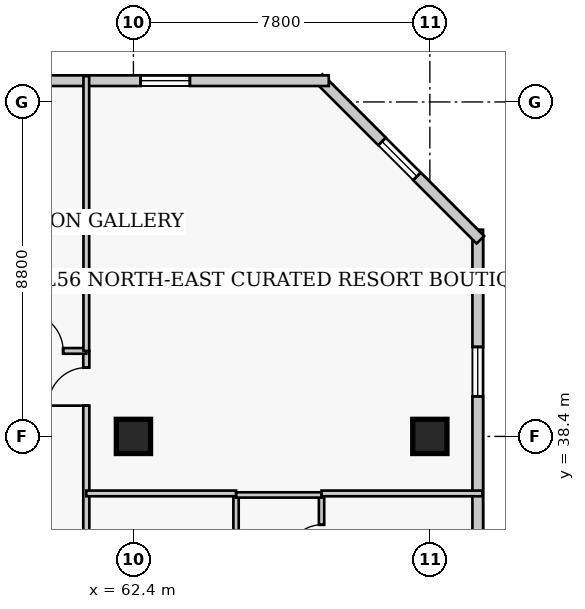
"""IFC4 building model, lengths in metres.
Left out: names, types, materials, properties, quantities, classifications, styles, units other than length and angle.
Written with IfcOpenShell. Run it as: python <this file> out.ifc"""

import sys

from ifc_helpers import new_model, si_unit, direction, frame, frame_2d, origin, origin_2d, place, context, subcontext, project, spatial, rectangle, extrude, element, fill, save


model = new_model("IFC4")
c1 = context("Model", 3, precision=1e-05, world=origin(), true_north=direction((0.0, 1.0)))
c2 = subcontext(c1, "Body", "Model", "MODEL_VIEW")
j1 = project(units=[si_unit("LENGTHUNIT", "METRE"), si_unit("PLANEANGLEUNIT", "RADIAN")], contexts=[c1])
p1 = place(None, origin())
s1 = spatial("IfcSite", under=j1, at=p1, CompositionType="ELEMENT")
p2 = place(p1, origin())
s2 = spatial("IfcBuilding", under=s1, at=p2, CompositionType="ELEMENT")
p3 = place(p2, frame((0.0, 0.0, 224.1)))
s3 = spatial("IfcBuildingStorey", under=s2, at=p3, CompositionType="ELEMENT", Elevation=224.1)
for number, where, z_axis, x_axis in (
    (1, (62.4, 38.4, 0.0), (0.0, 0.0, 1.0), (1.0, 0.0, 0.0)),
    (2, (70.2, 38.4, 0.0), (0.0, 0.0, 1.0), (1.0, 0.0, 0.0)),
):
    element("IfcColumn", number, at=place(p3, frame(where, z_axis=z_axis, x_axis=x_axis)), inside=s3, PredefinedType="COLUMN", context=c2, shape_type="SweptSolid", body=[
        extrude(rectangle(XDim=0.9, YDim=0.9, at=origin_2d()), origin(), (0.0, 0.0, 1.0), 3.9),
    ])
p4 = place(p3, frame((71.46, 13.96, 0.0), z_axis=(0.0, 0.0, 1.0), x_axis=(0.0, 1.0, 0.0)))
e3 = element("IfcWall", 3, at=p4, inside=s3, PredefinedType="SOLIDWALL", context=c2, shape_type="SweptSolid", body=[
    extrude(rectangle(XDim=29.88, YDim=0.28, at=frame_2d((14.94, 0.0))), origin(), (0.0, 0.0, 1.0), 3.65),
])
p5 = place(p4, frame((3.085, 0.0, 0.85)))
e4 = element("IfcOpeningElement", 4, at=p5, cuts=e3, PredefinedType="OPENING", context=c2, shape_type="SweptSolid", body=[
    extrude(rectangle(XDim=1.3, YDim=1.7, at=frame_2d((0.65, 0.85))), frame((0.0, 0.15, 0.0), z_axis=(0.0, -1.0, 0.0), x_axis=(1.0, 0.0, 0.0)), (0.0, 0.0, 1.0), 0.3),
])
p6 = place(p4, frame((10.555, 0.0, 0.85)))
e5 = element("IfcOpeningElement", 5, at=p6, cuts=e3, PredefinedType="OPENING", context=c2, shape_type="SweptSolid", body=[
    extrude(rectangle(XDim=1.3, YDim=1.7, at=frame_2d((0.65, 0.85))), frame((0.0, 0.15, 0.0), z_axis=(0.0, -1.0, 0.0), x_axis=(1.0, 0.0, 0.0)), (0.0, 0.0, 1.0), 0.3),
])
p7 = place(p4, frame((18.025, 0.0, 0.85)))
e6 = element("IfcOpeningElement", 6, at=p7, cuts=e3, PredefinedType="OPENING", context=c2, shape_type="SweptSolid", body=[
    extrude(rectangle(XDim=1.3, YDim=1.7, at=frame_2d((0.65, 0.85))), frame((0.0, 0.15, 0.0), z_axis=(0.0, -1.0, 0.0), x_axis=(1.0, 0.0, 0.0)), (0.0, 0.0, 1.0), 0.3),
])
p8 = place(p4, frame((25.495, 0.0, 0.85)))
e7 = element("IfcOpeningElement", 7, at=p8, cuts=e3, PredefinedType="OPENING", context=c2, shape_type="SweptSolid", body=[
    extrude(rectangle(XDim=1.3, YDim=1.7, at=frame_2d((0.65, 0.85))), frame((0.0, 0.15, 0.0), z_axis=(0.0, -1.0, 0.0), x_axis=(1.0, 0.0, 0.0)), (0.0, 0.0, 1.0), 0.3),
])
p9 = place(p3, frame((71.529, 43.573, 0.0), z_axis=(0.0, 0.0, 1.0), x_axis=(-0.707106781187, 0.707106781187, 0.0)))
e8 = element("IfcWall", 8, at=p9, inside=s3, PredefinedType="SOLIDWALL", context=c2, shape_type="SweptSolid", body=[
    extrude(rectangle(XDim=6.02, YDim=0.28, at=frame_2d((3.01, 0.0))), origin(), (0.0, 0.0, 1.0), 3.65),
])
p10 = place(p9, frame((2.36, 0.0, 0.85)))
e9 = element("IfcOpeningElement", 9, at=p10, cuts=e8, PredefinedType="OPENING", context=c2, shape_type="SweptSolid", body=[
    extrude(rectangle(XDim=1.3, YDim=1.7, at=frame_2d((0.65, 0.85))), frame((0.0, 0.15, 0.0), z_axis=(0.0, -1.0, 0.0), x_axis=(1.0, 0.0, 0.0)), (0.0, 0.0, 1.0), 0.3),
])
p11 = place(p3, frame((67.54, 47.76, 0.0), z_axis=(0.0, 0.0, 1.0), x_axis=(-1.0, 0.0, 0.0)))
e10 = element("IfcWall", 10, at=p11, inside=s3, PredefinedType="SOLIDWALL", context=c2, shape_type="SweptSolid", body=[
    extrude(rectangle(XDim=25.83, YDim=0.28, at=frame_2d((12.915, 0.0))), origin(), (0.0, 0.0, 1.0), 3.65),
])
p12 = place(p11, frame((16.14, 0.0, 0.0)))
e11 = element("IfcOpeningElement", 11, at=p12, cuts=e10, PredefinedType="OPENING", context=c2, shape_type="SweptSolid", body=[
    extrude(rectangle(XDim=1.4, YDim=2.15, at=frame_2d((0.7, 1.075))), frame((0.0, 0.15, 0.0), z_axis=(0.0, -1.0, 0.0), x_axis=(1.0, 0.0, 0.0)), (0.0, 0.0, 1.0), 0.3),
])
p13 = place(p11, frame((3.655, 0.0, 0.85)))
e12 = element("IfcOpeningElement", 12, at=p13, cuts=e10, PredefinedType="OPENING", context=c2, shape_type="SweptSolid", body=[
    extrude(rectangle(XDim=1.3, YDim=1.7, at=frame_2d((0.65, 0.85))), frame((0.0, 0.15, 0.0), z_axis=(0.0, -1.0, 0.0), x_axis=(1.0, 0.0, 0.0)), (0.0, 0.0, 1.0), 0.3),
])
p14 = place(p11, frame((22.025, 0.0, 0.85)))
e13 = element("IfcOpeningElement", 13, at=p14, cuts=e10, PredefinedType="OPENING", context=c2, shape_type="SweptSolid", body=[
    extrude(rectangle(XDim=1.3, YDim=1.7, at=frame_2d((0.65, 0.85))), frame((0.0, 0.15, 0.0), z_axis=(0.0, -1.0, 0.0), x_axis=(1.0, 0.0, 0.0)), (0.0, 0.0, 1.0), 0.3),
])
p15 = place(p3, frame((61.16, 11.95, 0.0), z_axis=(0.0, 0.0, 1.0), x_axis=(0.0, 1.0, 0.0)))
e14 = element("IfcWall", 14, at=p15, inside=s3, PredefinedType="PARTITIONING", context=c2, shape_type="SweptSolid", body=[
    extrude(rectangle(XDim=28.7, YDim=0.16, at=frame_2d((14.35, 0.0))), origin(), (0.0, 0.0, 1.0), 3.65),
])
p16 = place(p15, frame((3.55, 0.0, 0.0)))
e15 = element("IfcOpeningElement", 15, at=p16, cuts=e14, PredefinedType="OPENING", context=c2, shape_type="SweptSolid", body=[
    extrude(rectangle(XDim=0.95, YDim=2.1, at=frame_2d((0.475, 1.05))), frame((0.0, 0.09, 0.0), z_axis=(0.0, -1.0, 0.0), x_axis=(1.0, 0.0, 0.0)), (0.0, 0.0, 1.0), 0.18),
])
p17 = place(p15, frame((11.975, 0.0, 0.0)))
e16 = element("IfcOpeningElement", 16, at=p17, cuts=e14, PredefinedType="OPENING", context=c2, shape_type="SweptSolid", body=[
    extrude(rectangle(XDim=0.95, YDim=2.1, at=frame_2d((0.475, 1.05))), frame((0.0, 0.09, 0.0), z_axis=(0.0, -1.0, 0.0), x_axis=(1.0, 0.0, 0.0)), (0.0, 0.0, 1.0), 0.18),
])
p18 = place(p15, frame((20.425, 0.0, 0.0)))
e17 = element("IfcOpeningElement", 17, at=p18, cuts=e14, PredefinedType="OPENING", context=c2, shape_type="SweptSolid", body=[
    extrude(rectangle(XDim=0.95, YDim=2.1, at=frame_2d((0.475, 1.05))), frame((0.0, 0.09, 0.0), z_axis=(0.0, -1.0, 0.0), x_axis=(1.0, 0.0, 0.0)), (0.0, 0.0, 1.0), 0.18),
])
p19 = place(p15, frame((27.26, 0.0, 0.0)))
e18 = element("IfcOpeningElement", 18, at=p19, cuts=e14, PredefinedType="OPENING", context=c2, shape_type="SweptSolid", body=[
    extrude(rectangle(XDim=1.0, YDim=2.15, at=frame_2d((0.5, 1.075))), frame((0.0, 0.09, 0.0), z_axis=(0.0, -1.0, 0.0), x_axis=(1.0, 0.0, 0.0)), (0.0, 0.0, 1.0), 0.18),
])
p20 = place(p3, frame((56.8, 40.65, 0.0), z_axis=(0.0, 0.0, 1.0), x_axis=(1.0, 0.0, 0.0)))
e19 = element("IfcWall", 19, at=p20, inside=s3, PredefinedType="PARTITIONING", context=c2, shape_type="SweptSolid", body=[
    extrude(rectangle(XDim=4.36, YDim=0.15, at=frame_2d((2.18, 0.0))), origin(), (0.0, 0.0, 1.0), 3.65),
])
p21 = place(p20, frame((2.75, 0.0, 0.0)))
e20 = element("IfcOpeningElement", 20, at=p21, cuts=e19, PredefinedType="OPENING", context=c2, shape_type="SweptSolid", body=[
    extrude(rectangle(XDim=1.0, YDim=2.15, at=frame_2d((0.5, 1.075))), frame((0.0, 0.085, 0.0), z_axis=(0.0, -1.0, 0.0), x_axis=(1.0, 0.0, 0.0)), (0.0, 0.0, 1.0), 0.17),
])
p22 = place(p3, frame((61.16, 40.65, 0.0), z_axis=(0.0, 0.0, 1.0), x_axis=(0.0, 1.0, 0.0)))
e21 = element("IfcWall", 21, at=p22, inside=s3, PredefinedType="PARTITIONING", context=c2, shape_type="SweptSolid", body=[
    extrude(rectangle(XDim=7.23, YDim=0.15, at=frame_2d((3.615, 0.0))), origin(), (0.0, 0.0, 1.0), 3.65),
])
p23 = place(p3, frame((65.1, 34.41, 0.0), z_axis=(0.0, 0.0, 1.0), x_axis=(0.0, 1.0, 0.0)))
e22 = element("IfcWall", 22, at=p23, inside=s3, PredefinedType="PLUMBINGWALL", context=c2, shape_type="SweptSolid", body=[
    extrude(rectangle(XDim=2.45, YDim=0.14, at=frame_2d((1.225, 0.0))), origin(), (0.0, 0.0, 1.0), 3.65),
])
p24 = place(p3, frame((67.35, 34.41, 0.0), z_axis=(0.0, 0.0, 1.0), x_axis=(0.0, 1.0, 0.0)))
e23 = element("IfcWall", 23, at=p24, inside=s3, PredefinedType="PLUMBINGWALL", context=c2, shape_type="SweptSolid", body=[
    extrude(rectangle(XDim=2.45, YDim=0.14, at=frame_2d((1.225, 0.0))), origin(), (0.0, 0.0, 1.0), 3.65),
])
p25 = place(p24, frame((0.785, 0.0, 0.0)))
e24 = element("IfcOpeningElement", 24, at=p25, cuts=e23, PredefinedType="OPENING", context=c2, shape_type="SweptSolid", body=[
    extrude(rectangle(XDim=0.88, YDim=2.05, at=frame_2d((0.44, 1.025))), frame((0.0, 0.08, 0.0), z_axis=(0.0, -1.0, 0.0), x_axis=(1.0, 0.0, 0.0)), (0.0, 0.0, 1.0), 0.16),
])
p26 = place(p3, frame((65.1, 36.86, 0.0), z_axis=(0.0, 0.0, 1.0), x_axis=(1.0, 0.0, 0.0)))
e25 = element("IfcWall", 25, at=p26, inside=s3, PredefinedType="PLUMBINGWALL", context=c2, shape_type="SweptSolid", body=[
    extrude(rectangle(XDim=2.25, YDim=0.14, at=frame_2d((1.125, 0.0))), origin(), (0.0, 0.0, 1.0), 3.65),
])
p27 = place(p3, frame((61.16, 36.9, 0.0), z_axis=(0.0, 0.0, 1.0), x_axis=(1.0, 0.0, 0.0)))
e26 = element("IfcWall", 26, at=p27, inside=s3, PredefinedType="PARTITIONING", context=c2, shape_type="SweptSolid", body=[
    extrude(rectangle(XDim=3.94, YDim=0.15, at=frame_2d((1.97, 0.0))), origin(), (0.0, 0.0, 1.0), 3.65),
])
p28 = place(p3, frame((67.35, 36.9, 0.0), z_axis=(0.0, 0.0, 1.0), x_axis=(1.0, 0.0, 0.0)))
e27 = element("IfcWall", 27, at=p28, inside=s3, PredefinedType="PARTITIONING", context=c2, shape_type="SweptSolid", body=[
    extrude(rectangle(XDim=4.23, YDim=0.15, at=frame_2d((2.115, 0.0))), origin(), (0.0, 0.0, 1.0), 3.65),
])
p29 = place(p8, origin())
e28 = element("IfcWindow", 28, at=p29, inside=s3, PartitioningType="SINGLE_PANEL", PredefinedType="WINDOW", context=c2, shape_type="SweptSolid", body=[
    extrude(rectangle(XDim=1.3, YDim=1.7, at=frame_2d((0.65, 0.85))), frame((0.0, 0.03, 0.0), z_axis=(0.0, -1.0, 0.0), x_axis=(1.0, 0.0, 0.0)), (0.0, 0.0, 1.0), 0.06),
])
fill(e7, e28)
p30 = place(p10, origin())
e29 = element("IfcWindow", 29, at=p30, inside=s3, PartitioningType="SINGLE_PANEL", PredefinedType="WINDOW", context=c2, shape_type="SweptSolid", body=[
    extrude(rectangle(XDim=1.3, YDim=1.7, at=frame_2d((0.65, 0.85))), frame((0.0, 0.03, 0.0), z_axis=(0.0, -1.0, 0.0), x_axis=(1.0, 0.0, 0.0)), (0.0, 0.0, 1.0), 0.06),
])
fill(e9, e29)
p31 = place(p13, origin())
e30 = element("IfcWindow", 30, at=p31, inside=s3, PartitioningType="SINGLE_PANEL", PredefinedType="WINDOW", context=c2, shape_type="SweptSolid", body=[
    extrude(rectangle(XDim=1.3, YDim=1.7, at=frame_2d((0.65, 0.85))), frame((0.0, 0.03, 0.0), z_axis=(0.0, -1.0, 0.0), x_axis=(1.0, 0.0, 0.0)), (0.0, 0.0, 1.0), 0.06),
])
fill(e12, e30)
p32 = place(p21, origin())
e31 = element("IfcDoor", 31, at=p32, inside=s3, OperationType="SINGLE_SWING_LEFT", PredefinedType="DOOR", context=c2, shape_type="SweptSolid", body=[
    extrude(rectangle(XDim=1.0, YDim=2.15, at=frame_2d((0.5, 1.075))), frame((0.0, 0.025, 0.0), z_axis=(0.0, -1.0, 0.0), x_axis=(1.0, 0.0, 0.0)), (0.0, 0.0, 1.0), 0.05),
])
fill(e20, e31)
p33 = place(p25, origin())
e32 = element("IfcDoor", 32, at=p33, inside=s3, OperationType="SINGLE_SWING_LEFT", PredefinedType="DOOR", context=c2, shape_type="SweptSolid", body=[
    extrude(rectangle(XDim=0.88, YDim=2.05, at=frame_2d((0.44, 1.025))), frame((0.0, 0.025, 0.0), z_axis=(0.0, -1.0, 0.0), x_axis=(1.0, 0.0, 0.0)), (0.0, 0.0, 1.0), 0.05),
])
fill(e24, e32)
p34 = place(p19, origin())
e33 = element("IfcDoor", 33, at=p34, inside=s3, OperationType="SINGLE_SWING_LEFT", PredefinedType="DOOR", context=c2, shape_type="SweptSolid", body=[
    extrude(rectangle(XDim=1.0, YDim=2.15, at=frame_2d((0.5, 1.075))), frame((0.0, 0.025, 0.0), z_axis=(0.0, -1.0, 0.0), x_axis=(1.0, 0.0, 0.0)), (0.0, 0.0, 1.0), 0.05),
])
fill(e18, e33)
save(model, sys.argv[1])
